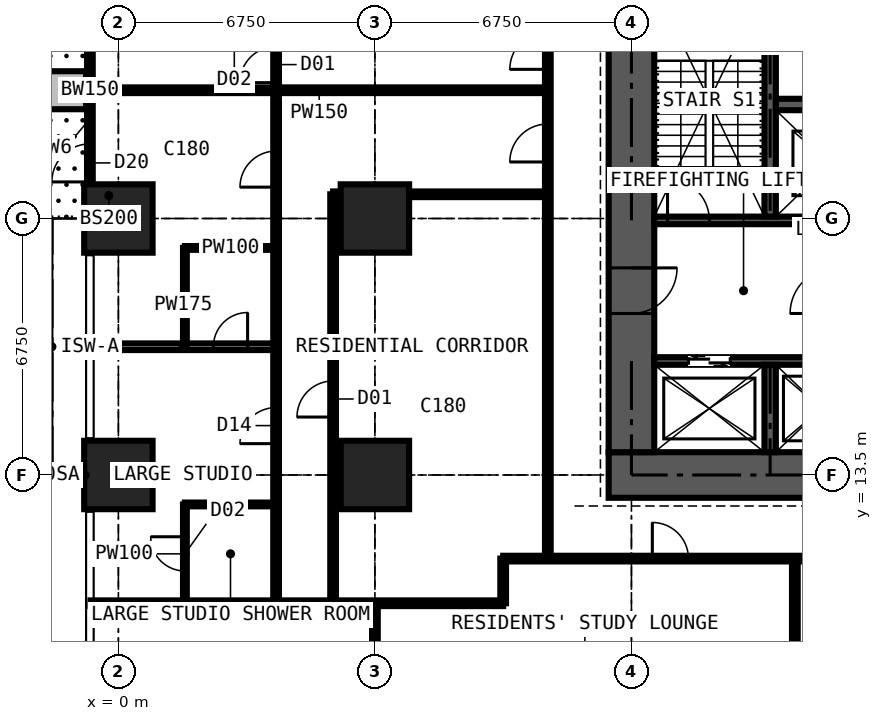
"""IFC4 building model, lengths in metres.
Left out: names, types, materials, properties, quantities, classifications, styles, units other than length and angle.
Written with IfcOpenShell. Run it as: python <this file> out.ifc"""

import sys

from ifc_helpers import new_model, si_unit, direction, frame, frame_2d, origin, origin_2d, place, context, subcontext, project, spatial, rectangle, extrude, element, fill, save


model = new_model("IFC4")
c1 = context("Model", 3, precision=1e-05, world=origin(), true_north=direction((0.0, 1.0)))
c2 = subcontext(c1, "Body", "Model", "MODEL_VIEW")
j1 = project(units=[si_unit("LENGTHUNIT", "METRE"), si_unit("PLANEANGLEUNIT", "RADIAN")], contexts=[c1])
p1 = place(None, origin())
s1 = spatial("IfcSite", under=j1, at=p1, CompositionType="ELEMENT")
p2 = place(p1, origin())
s2 = spatial("IfcBuilding", under=s1, at=p2, CompositionType="ELEMENT")
p3 = place(p2, frame((0.0, 0.0, 57.6)))
s3 = spatial("IfcBuildingStorey", under=s2, at=p3, CompositionType="ELEMENT", Elevation=57.6)
for number, where, z_axis, x_axis in (
    (1, (0.0, 13.5, 0.0), (0.0, 0.0, 1.0), (1.0, 0.0, 0.0)),
    (2, (0.0, 20.25, 0.0), (0.0, 0.0, 1.0), (1.0, 0.0, 0.0)),
    (3, (6.75, 13.5, 0.0), (0.0, 0.0, 1.0), (1.0, 0.0, 0.0)),
    (4, (6.75, 20.25, 0.0), (0.0, 0.0, 1.0), (1.0, 0.0, 0.0)),
):
    element("IfcColumn", number, at=place(p3, frame(where, z_axis=z_axis, x_axis=x_axis)), inside=s3, PredefinedType="COLUMN", context=c2, shape_type="SweptSolid", body=[
        extrude(rectangle(XDim=1.8, YDim=1.8, at=origin_2d()), origin(), (0.0, 0.0, 1.0), 3.6),
    ])
p4 = place(p3, frame((12.9, 13.5, 0.0), z_axis=(0.0, 0.0, 1.0), x_axis=(1.0, 0.0, 0.0)))
e5 = element("IfcWall", 5, at=p4, inside=s3, PredefinedType="SHEAR", context=c2, shape_type="SweptSolid", body=[
    extrude(rectangle(XDim=14.7, YDim=1.2, at=frame_2d((7.35, 0.0))), origin(), (0.0, 0.0, 1.0), 3.6),
])
p5 = place(p3, frame((13.5, 26.4, 0.0), z_axis=(0.0, 0.0, 1.0), x_axis=(0.0, -1.0, 0.0)))
e6 = element("IfcWall", 6, at=p5, inside=s3, PredefinedType="SHEAR", context=c2, shape_type="SweptSolid", body=[
    extrude(rectangle(XDim=12.3, YDim=1.2, at=frame_2d((6.15, 0.0))), origin(), (0.0, 0.0, 1.0), 3.6),
])
p6 = place(p5, frame((7.45, 0.0, 0.0)))
e7 = element("IfcOpeningElement", 7, at=p6, cuts=e6, PredefinedType="OPENING", context=c2, shape_type="SweptSolid", body=[
    extrude(rectangle(XDim=1.2, YDim=2.2, at=frame_2d((0.6, 1.1))), frame((0.0, 0.61, 0.0), z_axis=(0.0, -1.0, 0.0), x_axis=(1.0, 0.0, 0.0)), (0.0, 0.0, 1.0), 1.22),
])
p7 = place(p3, frame((-0.75, 20.25, 0.0), z_axis=(0.0, 0.0, 1.0), x_axis=(0.0, 1.0, 0.0)))
e8 = element("IfcWall", 8, at=p7, inside=s3, PredefinedType="SOLIDWALL", context=c2, shape_type="SweptSolid", body=[
    extrude(rectangle(XDim=6.75, YDim=0.15, at=frame_2d((3.375, 0.0))), origin(), (0.0, 0.0, 1.0), 3.375),
])
p8 = place(p7, frame((0.962, 0.0, 0.0)))
e9 = element("IfcOpeningElement", 9, at=p8, cuts=e8, PredefinedType="OPENING", context=c2, shape_type="SweptSolid", body=[
    extrude(rectangle(XDim=1.0, YDim=2.2, at=frame_2d((0.5, 1.1))), frame((0.0, 0.085, 0.0), z_axis=(0.0, -1.0, 0.0), x_axis=(1.0, 0.0, 0.0)), (0.0, 0.0, 1.0), 0.17),
])
p9 = place(p7, frame((2.025, 0.0, 0.9)))
e10 = element("IfcOpeningElement", 10, at=p9, cuts=e8, PredefinedType="OPENING", context=c2, shape_type="SweptSolid", body=[
    extrude(rectangle(XDim=1.2, YDim=1.8, at=frame_2d((0.6, 0.9))), frame((0.0, 0.085, 0.0), z_axis=(0.0, -1.0, 0.0), x_axis=(1.0, 0.0, 0.0)), (0.0, 0.0, 1.0), 0.17),
])
p10 = place(p7, frame((4.788, 0.0, 0.0)))
e11 = element("IfcOpeningElement", 11, at=p10, cuts=e8, PredefinedType="OPENING", context=c2, shape_type="SweptSolid", body=[
    extrude(rectangle(XDim=1.0, YDim=2.2, at=frame_2d((0.5, 1.1))), frame((0.0, 0.085, 0.0), z_axis=(0.0, -1.0, 0.0), x_axis=(1.0, 0.0, 0.0)), (0.0, 0.0, 1.0), 0.17),
])
p11 = place(p7, frame((3.525, 0.0, 0.9)))
e12 = element("IfcOpeningElement", 12, at=p11, cuts=e8, PredefinedType="OPENING", context=c2, shape_type="SweptSolid", body=[
    extrude(rectangle(XDim=1.2, YDim=1.8, at=frame_2d((0.6, 0.9))), frame((0.0, 0.085, 0.0), z_axis=(0.0, -1.0, 0.0), x_axis=(1.0, 0.0, 0.0)), (0.0, 0.0, 1.0), 0.17),
])
p12 = place(p3, frame((-0.85, 23.625, 0.0), z_axis=(0.0, 0.0, 1.0), x_axis=(-1.0, 0.0, 0.0)))
e13 = element("IfcWall", 13, at=p12, inside=s3, PredefinedType="USERDEFINED", context=c2, shape_type="SweptSolid", body=[
    extrude(rectangle(XDim=2.2, YDim=1.0, at=frame_2d((1.1, 0.0))), origin(), (0.0, 0.0, 1.0), 0.9),
])
p13 = place(p3, frame((14.1, 16.5, 0.0), z_axis=(0.0, 0.0, 1.0), x_axis=(1.0, 0.0, 0.0)))
e14 = element("IfcWall", 14, at=p13, inside=s3, PredefinedType="SHEAR", context=c2, shape_type="SweptSolid", body=[
    extrude(rectangle(XDim=12.3, YDim=0.2, at=frame_2d((6.15, 0.0))), origin(), (0.0, 0.0, 1.0), 3.6),
])
p14 = place(p13, frame((0.9, 0.0, 0.0)))
e15 = element("IfcOpeningElement", 15, at=p14, cuts=e14, PredefinedType="OPENING", context=c2, shape_type="SweptSolid", body=[
    extrude(rectangle(XDim=1.1, YDim=2.2, at=frame_2d((0.55, 1.1))), frame((0.0, 0.11, 0.0), z_axis=(0.0, -1.0, 0.0), x_axis=(1.0, 0.0, 0.0)), (0.0, 0.0, 1.0), 0.22),
])
p15 = place(p13, frame((9.5, 0.0, 0.0)))
e16 = element("IfcOpeningElement", 16, at=p15, cuts=e14, PredefinedType="OPENING", context=c2, shape_type="SweptSolid", body=[
    extrude(rectangle(XDim=1.1, YDim=2.2, at=frame_2d((0.55, 1.1))), frame((0.0, 0.11, 0.0), z_axis=(0.0, -1.0, 0.0), x_axis=(1.0, 0.0, 0.0)), (0.0, 0.0, 1.0), 0.22),
])
p16 = place(p3, frame((14.1, 20.2, 0.0), z_axis=(0.0, 0.0, 1.0), x_axis=(1.0, 0.0, 0.0)))
e17 = element("IfcWall", 17, at=p16, inside=s3, PredefinedType="SHEAR", context=c2, shape_type="SweptSolid", body=[
    extrude(rectangle(XDim=12.3, YDim=0.2, at=frame_2d((6.15, 0.0))), origin(), (0.0, 0.0, 1.0), 3.6),
])
p17 = place(p16, frame((0.35, 0.0, 0.0)))
e18 = element("IfcOpeningElement", 18, at=p17, cuts=e17, PredefinedType="OPENING", context=c2, shape_type="SweptSolid", body=[
    extrude(rectangle(XDim=1.1, YDim=2.2, at=frame_2d((0.55, 1.1))), frame((0.0, 0.11, 0.0), z_axis=(0.0, -1.0, 0.0), x_axis=(1.0, 0.0, 0.0)), (0.0, 0.0, 1.0), 0.22),
])
p18 = place(p16, frame((9.75, 0.0, 0.0)))
e19 = element("IfcOpeningElement", 19, at=p18, cuts=e17, PredefinedType="OPENING", context=c2, shape_type="SweptSolid", body=[
    extrude(rectangle(XDim=1.1, YDim=2.2, at=frame_2d((0.55, 1.1))), frame((0.0, 0.11, 0.0), z_axis=(0.0, -1.0, 0.0), x_axis=(1.0, 0.0, 0.0)), (0.0, 0.0, 1.0), 0.22),
])
p19 = place(p3, frame((17.15, 20.3, 0.0), z_axis=(0.0, 0.0, 1.0), x_axis=(0.0, 1.0, 0.0)))
e20 = element("IfcWall", 20, at=p19, inside=s3, PredefinedType="SHEAR", context=c2, shape_type="SweptSolid", body=[
    extrude(rectangle(XDim=6.1, YDim=0.3, at=frame_2d((3.05, 0.0))), origin(), (0.0, 0.0, 1.0), 3.6),
])
p20 = place(p3, frame((17.3, 23.25, 0.0), z_axis=(0.0, 0.0, 1.0), x_axis=(1.0, 0.0, 0.0)))
e21 = element("IfcWall", 21, at=p20, inside=s3, PredefinedType="SHEAR", context=c2, shape_type="SweptSolid", body=[
    extrude(rectangle(XDim=5.9, YDim=0.3, at=frame_2d((2.95, 0.0))), origin(), (0.0, 0.0, 1.0), 3.6),
])
p21 = place(p3, frame((17.15, 14.1, 0.0), z_axis=(0.0, 0.0, 1.0), x_axis=(0.0, 1.0, 0.0)))
e22 = element("IfcWall", 22, at=p21, inside=s3, PredefinedType="SHEAR", context=c2, shape_type="SweptSolid", body=[
    extrude(rectangle(XDim=2.3, YDim=0.3, at=frame_2d((1.15, 0.0))), origin(), (0.0, 0.0, 1.0), 3.6),
])
p22 = place(p3, frame((-0.734, 10.125, 0.0), z_axis=(0.0, 0.0, 1.0), x_axis=(1.0, 0.0, 0.0)))
e23 = element("IfcWall", 23, at=p22, inside=s3, PredefinedType="PARTITIONING", context=c2, shape_type="SweptSolid", body=[
    extrude(rectangle(XDim=10.859, YDim=0.15, at=frame_2d((5.429, 0.0))), origin(), (0.0, 0.0, 1.0), 3.375),
])
p23 = place(p3, frame((-0.734, 16.875, 0.0), z_axis=(0.0, 0.0, 1.0), x_axis=(1.0, 0.0, 0.0)))
e24 = element("IfcWall", 24, at=p23, inside=s3, PredefinedType="PARTITIONING", context=c2, shape_type="SweptSolid", body=[
    extrude(rectangle(XDim=4.884, YDim=0.175, at=frame_2d((2.442, 0.0))), origin(), (0.0, 0.0, 1.0), 3.375),
])
p24 = place(p23, frame((3.234, 0.0, 0.0)))
e25 = element("IfcOpeningElement", 25, at=p24, cuts=e24, PredefinedType="OPENING", context=c2, shape_type="SweptSolid", body=[
    extrude(rectangle(XDim=0.9, YDim=2.2, at=frame_2d((0.45, 1.1))), frame((0.0, 0.097, 0.0), z_axis=(0.0, -1.0, 0.0), x_axis=(1.0, 0.0, 0.0)), (0.0, 0.0, 1.0), 0.195),
])
p25 = place(p3, frame((-0.734, 23.625, 0.0), z_axis=(0.0, 0.0, 1.0), x_axis=(1.0, 0.0, 0.0)))
e26 = element("IfcWall", 26, at=p25, inside=s3, PredefinedType="PARTITIONING", context=c2, shape_type="SweptSolid", body=[
    extrude(rectangle(XDim=12.034, YDim=0.15, at=frame_2d((6.017, 0.0))), origin(), (0.0, 0.0, 1.0), 3.375),
])
p26 = place(p3, frame((1.75, 10.125, 0.0), z_axis=(0.0, 0.0, 1.0), x_axis=(0.0, 1.0, 0.0)))
e27 = element("IfcWall", 27, at=p26, inside=s3, PredefinedType="PARTITIONING", context=c2, shape_type="SweptSolid", body=[
    extrude(rectangle(XDim=2.6, YDim=0.1, at=frame_2d((1.3, 0.0))), origin(), (0.0, 0.0, 1.0), 3.375),
])
p27 = place(p26, frame((0.85, 0.0, 0.0)))
e28 = element("IfcOpeningElement", 28, at=p27, cuts=e27, PredefinedType="OPENING", context=c2, shape_type="SweptSolid", body=[
    extrude(rectangle(XDim=0.9, YDim=2.2, at=frame_2d((0.45, 1.1))), frame((0.0, 0.06, 0.0), z_axis=(0.0, -1.0, 0.0), x_axis=(1.0, 0.0, 0.0)), (0.0, 0.0, 1.0), 0.12),
])
p28 = place(p3, frame((1.75, 12.725, 0.0), z_axis=(0.0, 0.0, 1.0), x_axis=(1.0, 0.0, 0.0)))
e29 = element("IfcWall", 29, at=p28, inside=s3, PredefinedType="PARTITIONING", context=c2, shape_type="SweptSolid", body=[
    extrude(rectangle(XDim=2.4, YDim=0.1, at=frame_2d((1.2, 0.0))), origin(), (0.0, 0.0, 1.0), 3.375),
])
p29 = place(p3, frame((1.75, 16.875, 0.0), z_axis=(0.0, 0.0, 1.0), x_axis=(0.0, 1.0, 0.0)))
e30 = element("IfcWall", 30, at=p29, inside=s3, PredefinedType="PARTITIONING", context=c2, shape_type="SweptSolid", body=[
    extrude(rectangle(XDim=2.6, YDim=0.1, at=frame_2d((1.3, 0.0))), origin(), (0.0, 0.0, 1.0), 3.375),
])
p30 = place(p3, frame((1.75, 19.475, 0.0), z_axis=(0.0, 0.0, 1.0), x_axis=(1.0, 0.0, 0.0)))
e31 = element("IfcWall", 31, at=p30, inside=s3, PredefinedType="PARTITIONING", context=c2, shape_type="SweptSolid", body=[
    extrude(rectangle(XDim=2.4, YDim=0.1, at=frame_2d((1.2, 0.0))), origin(), (0.0, 0.0, 1.0), 3.375),
])
p31 = place(p3, frame((4.15, 10.125, 0.0), z_axis=(0.0, 0.0, 1.0), x_axis=(0.0, 1.0, 0.0)))
e32 = element("IfcWall", 32, at=p31, inside=s3, PredefinedType="PARTITIONING", context=c2, shape_type="SweptSolid", body=[
    extrude(rectangle(XDim=23.625, YDim=0.15, at=frame_2d((11.812, 0.0))), origin(), (0.0, 0.0, 1.0), 3.375),
])
p32 = place(p31, frame((19.775, 0.0, 0.0)))
e33 = element("IfcOpeningElement", 33, at=p32, cuts=e32, PredefinedType="OPENING", context=c2, shape_type="SweptSolid", body=[
    extrude(rectangle(XDim=1.0, YDim=2.2, at=frame_2d((0.5, 1.1))), frame((0.0, 0.085, 0.0), z_axis=(0.0, -1.0, 0.0), x_axis=(1.0, 0.0, 0.0)), (0.0, 0.0, 1.0), 0.17),
])
p33 = place(p31, frame((13.7, 0.0, 0.0)))
e34 = element("IfcOpeningElement", 34, at=p33, cuts=e32, PredefinedType="OPENING", context=c2, shape_type="SweptSolid", body=[
    extrude(rectangle(XDim=0.95, YDim=2.2, at=frame_2d((0.475, 1.1))), frame((0.0, 0.085, 0.0), z_axis=(0.0, -1.0, 0.0), x_axis=(1.0, 0.0, 0.0)), (0.0, 0.0, 1.0), 0.17),
])
p34 = place(p31, frame((4.2, 0.0, 0.0)))
e35 = element("IfcOpeningElement", 35, at=p34, cuts=e32, PredefinedType="OPENING", context=c2, shape_type="SweptSolid", body=[
    extrude(rectangle(XDim=0.95, YDim=2.2, at=frame_2d((0.475, 1.1))), frame((0.0, 0.085, 0.0), z_axis=(0.0, -1.0, 0.0), x_axis=(1.0, 0.0, 0.0)), (0.0, 0.0, 1.0), 0.17),
])
p35 = place(p31, frame((10.95, 0.0, 0.0)))
e36 = element("IfcOpeningElement", 36, at=p35, cuts=e32, PredefinedType="OPENING", context=c2, shape_type="SweptSolid", body=[
    extrude(rectangle(XDim=0.95, YDim=2.2, at=frame_2d((0.475, 1.1))), frame((0.0, 0.085, 0.0), z_axis=(0.0, -1.0, 0.0), x_axis=(1.0, 0.0, 0.0)), (0.0, 0.0, 1.0), 0.17),
])
p36 = place(p3, frame((5.65, 10.125, 0.0), z_axis=(0.0, 0.0, 1.0), x_axis=(0.0, 1.0, 0.0)))
e37 = element("IfcWall", 37, at=p36, inside=s3, PredefinedType="PARTITIONING", context=c2, shape_type="SweptSolid", body=[
    extrude(rectangle(XDim=10.762, YDim=0.15, at=frame_2d((5.381, 0.0))), origin(), (0.0, 0.0, 1.0), 3.375),
])
p37 = place(p36, frame((4.9, 0.0, 0.0)))
e38 = element("IfcOpeningElement", 38, at=p37, cuts=e37, PredefinedType="OPENING", context=c2, shape_type="SweptSolid", body=[
    extrude(rectangle(XDim=0.95, YDim=2.2, at=frame_2d((0.475, 1.1))), frame((0.0, 0.085, 0.0), z_axis=(0.0, -1.0, 0.0), x_axis=(1.0, 0.0, 0.0)), (0.0, 0.0, 1.0), 0.17),
])
p38 = place(p3, frame((5.65, 20.887, 0.0), z_axis=(0.0, 0.0, 1.0), x_axis=(1.0, 0.0, 0.0)))
e39 = element("IfcWall", 39, at=p38, inside=s3, PredefinedType="PARTITIONING", context=c2, shape_type="SweptSolid", body=[
    extrude(rectangle(XDim=5.65, YDim=0.15, at=frame_2d((2.825, 0.0))), origin(), (0.0, 0.0, 1.0), 3.375),
])
p39 = place(p3, frame((6.75, 4.15, 0.0), z_axis=(0.0, 0.0, 1.0), x_axis=(0.0, 1.0, 0.0)))
e40 = element("IfcWall", 40, at=p39, inside=s3, PredefinedType="PARTITIONING", context=c2, shape_type="SweptSolid", body=[
    extrude(rectangle(XDim=5.975, YDim=0.15, at=frame_2d((2.988, 0.0))), origin(), (0.0, 0.0, 1.0), 2.877),
])
p40 = place(p3, frame((10.125, 10.125, 0.0), z_axis=(0.0, 0.0, 1.0), x_axis=(0.0, 1.0, 0.0)))
e41 = element("IfcWall", 41, at=p40, inside=s3, PredefinedType="PARTITIONING", context=c2, shape_type="SweptSolid", body=[
    extrude(rectangle(XDim=1.175, YDim=0.15, at=frame_2d((0.587, 0.0))), origin(), (0.0, 0.0, 1.0), 3.375),
])
p41 = place(p3, frame((10.125, 11.3, 0.0), z_axis=(0.0, 0.0, 1.0), x_axis=(1.0, 0.0, 0.0)))
e42 = element("IfcWall", 42, at=p41, inside=s3, PredefinedType="PARTITIONING", context=c2, shape_type="SweptSolid", body=[
    extrude(rectangle(XDim=20.675, YDim=0.15, at=frame_2d((10.337, 0.0))), origin(), (0.0, 0.0, 1.0), 3.375),
])
p42 = place(p41, frame((8.375, 0.0, 0.0)))
e43 = element("IfcOpeningElement", 43, at=p42, cuts=e42, PredefinedType="OPENING", context=c2, shape_type="SweptSolid", body=[
    extrude(rectangle(XDim=1.0, YDim=2.2, at=frame_2d((0.5, 1.1))), frame((0.0, 0.085, 0.0), z_axis=(0.0, -1.0, 0.0), x_axis=(1.0, 0.0, 0.0)), (0.0, 0.0, 1.0), 0.17),
])
p43 = place(p41, frame((10.975, 0.0, 0.0)))
e44 = element("IfcOpeningElement", 44, at=p43, cuts=e42, PredefinedType="OPENING", context=c2, shape_type="SweptSolid", body=[
    extrude(rectangle(XDim=1.0, YDim=2.2, at=frame_2d((0.5, 1.1))), frame((0.0, 0.085, 0.0), z_axis=(0.0, -1.0, 0.0), x_axis=(1.0, 0.0, 0.0)), (0.0, 0.0, 1.0), 0.17),
])
p44 = place(p41, frame((3.925, 0.0, 0.0)))
e45 = element("IfcOpeningElement", 45, at=p44, cuts=e42, PredefinedType="OPENING", context=c2, shape_type="SweptSolid", body=[
    extrude(rectangle(XDim=0.95, YDim=2.2, at=frame_2d((0.475, 1.1))), frame((0.0, 0.085, 0.0), z_axis=(0.0, -1.0, 0.0), x_axis=(1.0, 0.0, 0.0)), (0.0, 0.0, 1.0), 0.17),
])
p45 = place(p3, frame((11.3, 11.3, 0.0), z_axis=(0.0, 0.0, 1.0), x_axis=(0.0, 1.0, 0.0)))
e46 = element("IfcWall", 46, at=p45, inside=s3, PredefinedType="PARTITIONING", context=c2, shape_type="SweptSolid", body=[
    extrude(rectangle(XDim=19.075, YDim=0.15, at=frame_2d((9.538, 0.0))), origin(), (0.0, 0.0, 1.0), 3.375),
])
p46 = place(p45, frame((12.875, 0.0, 0.0)))
e47 = element("IfcOpeningElement", 47, at=p46, cuts=e46, PredefinedType="OPENING", context=c2, shape_type="SweptSolid", body=[
    extrude(rectangle(XDim=1.0, YDim=2.2, at=frame_2d((0.5, 1.1))), frame((0.0, 0.085, 0.0), z_axis=(0.0, -1.0, 0.0), x_axis=(1.0, 0.0, 0.0)), (0.0, 0.0, 1.0), 0.17),
])
p47 = place(p45, frame((10.438, 0.0, 0.0)))
e48 = element("IfcOpeningElement", 48, at=p47, cuts=e46, PredefinedType="OPENING", context=c2, shape_type="SweptSolid", body=[
    extrude(rectangle(XDim=1.0, YDim=2.2, at=frame_2d((0.5, 1.1))), frame((0.0, 0.085, 0.0), z_axis=(0.0, -1.0, 0.0), x_axis=(1.0, 0.0, 0.0)), (0.0, 0.0, 1.0), 0.17),
])
p48 = place(p45, frame((15.675, 0.0, 0.0)))
e49 = element("IfcOpeningElement", 49, at=p48, cuts=e46, PredefinedType="OPENING", context=c2, shape_type="SweptSolid", body=[
    extrude(rectangle(XDim=0.95, YDim=2.2, at=frame_2d((0.475, 1.1))), frame((0.0, 0.085, 0.0), z_axis=(0.0, -1.0, 0.0), x_axis=(1.0, 0.0, 0.0)), (0.0, 0.0, 1.0), 0.17),
])
p49 = place(p3, frame((17.8, 5.65, 0.0), z_axis=(0.0, 0.0, 1.0), x_axis=(0.0, 1.0, 0.0)))
e50 = element("IfcWall", 50, at=p49, inside=s3, PredefinedType="PARTITIONING", context=c2, shape_type="SweptSolid", body=[
    extrude(rectangle(XDim=5.65, YDim=0.15, at=frame_2d((2.825, 0.0))), origin(), (0.0, 0.0, 1.0), 3.375),
])
p50 = place(p8, origin())
e51 = element("IfcDoor", 51, at=p50, inside=s3, OperationType="SINGLE_SWING_LEFT", PredefinedType="DOOR", context=c2, shape_type="SweptSolid", body=[
    extrude(rectangle(XDim=1.0, YDim=2.2, at=frame_2d((0.5, 1.1))), frame((0.0, 0.025, 0.0), z_axis=(0.0, -1.0, 0.0), x_axis=(1.0, 0.0, 0.0)), (0.0, 0.0, 1.0), 0.05),
])
fill(e9, e51)
p51 = place(p9, origin())
e52 = element("IfcWindow", 52, at=p51, inside=s3, PartitioningType="SINGLE_PANEL", PredefinedType="WINDOW", context=c2, shape_type="SweptSolid", body=[
    extrude(rectangle(XDim=1.2, YDim=1.8, at=frame_2d((0.6, 0.9))), frame((0.0, 0.03, 0.0), z_axis=(0.0, -1.0, 0.0), x_axis=(1.0, 0.0, 0.0)), (0.0, 0.0, 1.0), 0.06),
])
fill(e10, e52)
p52 = place(p11, origin())
e53 = element("IfcWindow", 53, at=p52, inside=s3, PartitioningType="SINGLE_PANEL", PredefinedType="WINDOW", context=c2, shape_type="SweptSolid", body=[
    extrude(rectangle(XDim=1.2, YDim=1.8, at=frame_2d((0.6, 0.9))), frame((0.0, 0.03, 0.0), z_axis=(0.0, -1.0, 0.0), x_axis=(1.0, 0.0, 0.0)), (0.0, 0.0, 1.0), 0.06),
])
fill(e12, e53)
p53 = place(p14, origin())
e54 = element("IfcDoor", 54, at=p53, inside=s3, OperationType="DOUBLE_DOOR_SLIDING", PredefinedType="DOOR", context=c2, shape_type="SweptSolid", body=[
    extrude(rectangle(XDim=1.1, YDim=2.2, at=frame_2d((0.55, 1.1))), frame((0.0, 0.025, 0.0), z_axis=(0.0, -1.0, 0.0), x_axis=(1.0, 0.0, 0.0)), (0.0, 0.0, 1.0), 0.05),
])
fill(e15, e54)
p54 = place(p6, origin())
e55 = element("IfcDoor", 55, at=p54, inside=s3, OperationType="DOUBLE_DOOR_SINGLE_SWING", PredefinedType="DOOR", context=c2, shape_type="SweptSolid", body=[
    extrude(rectangle(XDim=1.2, YDim=2.2, at=frame_2d((0.6, 1.1))), frame((0.0, 0.025, 0.0), z_axis=(0.0, -1.0, 0.0), x_axis=(1.0, 0.0, 0.0)), (0.0, 0.0, 1.0), 0.05),
])
fill(e7, e55)
p55 = place(p17, origin())
e56 = element("IfcDoor", 56, at=p55, inside=s3, OperationType="SINGLE_SWING_LEFT", PredefinedType="DOOR", context=c2, shape_type="SweptSolid", body=[
    extrude(rectangle(XDim=1.1, YDim=2.2, at=frame_2d((0.55, 1.1))), frame((0.0, 0.025, 0.0), z_axis=(0.0, -1.0, 0.0), x_axis=(1.0, 0.0, 0.0)), (0.0, 0.0, 1.0), 0.05),
])
fill(e18, e56)
p56 = place(p44, origin())
e57 = element("IfcDoor", 57, at=p56, inside=s3, OperationType="SINGLE_SWING_LEFT", PredefinedType="DOOR", context=c2, shape_type="SweptSolid", body=[
    extrude(rectangle(XDim=0.95, YDim=2.2, at=frame_2d((0.475, 1.1))), frame((0.0, 0.025, 0.0), z_axis=(0.0, -1.0, 0.0), x_axis=(1.0, 0.0, 0.0)), (0.0, 0.0, 1.0), 0.05),
])
fill(e45, e57)
p57 = place(p33, origin())
e58 = element("IfcDoor", 58, at=p57, inside=s3, OperationType="SINGLE_SWING_LEFT", PredefinedType="DOOR", context=c2, shape_type="SweptSolid", body=[
    extrude(rectangle(XDim=0.95, YDim=2.2, at=frame_2d((0.475, 1.1))), frame((0.0, 0.025, 0.0), z_axis=(0.0, -1.0, 0.0), x_axis=(1.0, 0.0, 0.0)), (0.0, 0.0, 1.0), 0.05),
])
fill(e34, e58)
p58 = place(p46, origin())
e59 = element("IfcDoor", 59, at=p58, inside=s3, OperationType="SINGLE_SWING_LEFT", PredefinedType="DOOR", context=c2, shape_type="SweptSolid", body=[
    extrude(rectangle(XDim=1.0, YDim=2.2, at=frame_2d((0.5, 1.1))), frame((0.0, 0.025, 0.0), z_axis=(0.0, -1.0, 0.0), x_axis=(1.0, 0.0, 0.0)), (0.0, 0.0, 1.0), 0.05),
])
fill(e47, e59)
p59 = place(p34, origin())
e60 = element("IfcDoor", 60, at=p59, inside=s3, OperationType="SINGLE_SWING_LEFT", PredefinedType="DOOR", context=c2, shape_type="SweptSolid", body=[
    extrude(rectangle(XDim=0.95, YDim=2.2, at=frame_2d((0.475, 1.1))), frame((0.0, 0.025, 0.0), z_axis=(0.0, -1.0, 0.0), x_axis=(1.0, 0.0, 0.0)), (0.0, 0.0, 1.0), 0.05),
])
fill(e35, e60)
p60 = place(p27, origin())
e61 = element("IfcDoor", 61, at=p60, inside=s3, OperationType="SINGLE_SWING_RIGHT", PredefinedType="DOOR", context=c2, shape_type="SweptSolid", body=[
    extrude(rectangle(XDim=0.9, YDim=2.2, at=frame_2d((0.45, 1.1))), frame((0.0, 0.025, 0.0), z_axis=(0.0, -1.0, 0.0), x_axis=(1.0, 0.0, 0.0)), (0.0, 0.0, 1.0), 0.05),
])
fill(e28, e61)
p61 = place(p35, origin())
e62 = element("IfcDoor", 62, at=p61, inside=s3, OperationType="SINGLE_SWING_LEFT", PredefinedType="DOOR", context=c2, shape_type="SweptSolid", body=[
    extrude(rectangle(XDim=0.95, YDim=2.2, at=frame_2d((0.475, 1.1))), frame((0.0, 0.025, 0.0), z_axis=(0.0, -1.0, 0.0), x_axis=(1.0, 0.0, 0.0)), (0.0, 0.0, 1.0), 0.05),
])
fill(e36, e62)
p62 = place(p24, origin())
e63 = element("IfcDoor", 63, at=p62, inside=s3, OperationType="SINGLE_SWING_RIGHT", PredefinedType="DOOR", context=c2, shape_type="SweptSolid", body=[
    extrude(rectangle(XDim=0.9, YDim=2.2, at=frame_2d((0.45, 1.1))), frame((0.0, 0.025, 0.0), z_axis=(0.0, -1.0, 0.0), x_axis=(1.0, 0.0, 0.0)), (0.0, 0.0, 1.0), 0.05),
])
fill(e25, e63)
p63 = place(p47, origin())
e64 = element("IfcDoor", 64, at=p63, inside=s3, OperationType="SINGLE_SWING_LEFT", PredefinedType="DOOR", context=c2, shape_type="SweptSolid", body=[
    extrude(rectangle(XDim=1.0, YDim=2.2, at=frame_2d((0.5, 1.1))), frame((0.0, 0.025, 0.0), z_axis=(0.0, -1.0, 0.0), x_axis=(1.0, 0.0, 0.0)), (0.0, 0.0, 1.0), 0.05),
])
fill(e48, e64)
p64 = place(p37, origin())
e65 = element("IfcDoor", 65, at=p64, inside=s3, OperationType="SINGLE_SWING_LEFT", PredefinedType="DOOR", context=c2, shape_type="SweptSolid", body=[
    extrude(rectangle(XDim=0.95, YDim=2.2, at=frame_2d((0.475, 1.1))), frame((0.0, 0.025, 0.0), z_axis=(0.0, -1.0, 0.0), x_axis=(1.0, 0.0, 0.0)), (0.0, 0.0, 1.0), 0.05),
])
fill(e38, e65)
save(model, sys.argv[1])
